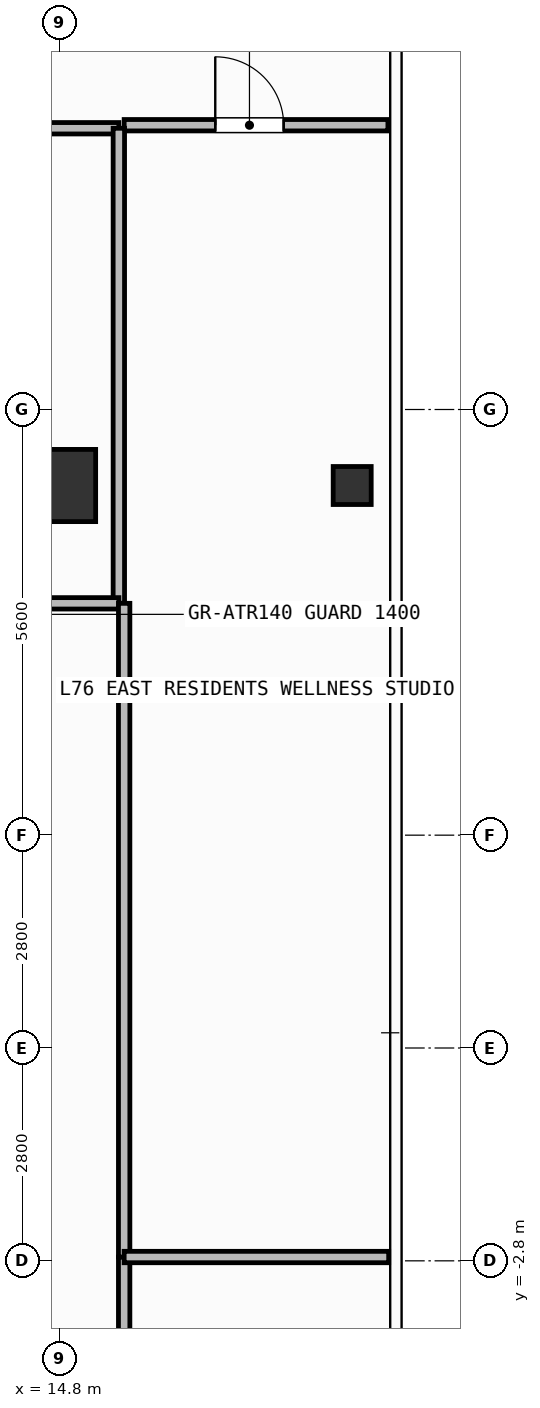
"""IFC4 building model, lengths in metres.
Left out: names, types, materials, properties, quantities, classifications, styles, units other than length and angle.
Written with IfcOpenShell. Run it as: python <this file> out.ifc"""

import sys

from ifc_helpers import new_model, si_unit, direction, frame, frame_2d, origin, origin_2d, place, context, subcontext, project, spatial, rectangle, hollow_rectangle, extrude, element, fill, save


model = new_model("IFC4")
c1 = context("Model", 3, precision=1e-05, world=origin(), true_north=direction((0.0, 1.0)))
c2 = subcontext(c1, "Body", "Model", "MODEL_VIEW")
j1 = project(units=[si_unit("LENGTHUNIT", "METRE"), si_unit("PLANEANGLEUNIT", "RADIAN")], contexts=[c1])
p1 = place(None, origin())
s1 = spatial("IfcSite", under=j1, at=p1, CompositionType="ELEMENT")
p2 = place(p1, origin())
s2 = spatial("IfcBuilding", under=s1, at=p2, CompositionType="ELEMENT")
p3 = place(p2, frame((0.0, 0.0, 309.3)))
s3 = spatial("IfcBuildingStorey", under=s2, at=p3, CompositionType="ELEMENT", Elevation=309.3)
p4 = place(p3, frame((14.8, 7.4, 0.0), z_axis=(0.0, 0.0, 1.0), x_axis=(1.0, 0.0, 0.0)))
e1 = element("IfcColumn", 1, at=p4, inside=s3, PredefinedType="COLUMN", context=c2, shape_type="SweptSolid", body=[
    extrude(rectangle(XDim=0.95, YDim=0.95, at=origin_2d()), origin(), (0.0, 0.0, 1.0), 3.9),
])
p5 = place(p3, frame((18.65, 7.4, 0.0), z_axis=(0.0, 0.0, 1.0), x_axis=(1.0, 0.0, 0.0)))
e2 = element("IfcColumn", 2, at=p5, inside=s3, PredefinedType="COLUMN", context=c2, shape_type="SweptSolid", body=[
    extrude(hollow_rectangle(XDim=0.5, YDim=0.5, WallThickness=0.025, at=origin_2d()), origin(), (0.0, 0.0, 1.0), 3.9),
])
p6 = place(p3, frame((8.36, 12.1, 0.0), z_axis=(0.0, 0.0, 1.0), x_axis=(1.0, 0.0, 0.0)))
e3 = element("IfcWall", 3, at=p6, inside=s3, PredefinedType="PARTITIONING", context=c2, shape_type="SweptSolid", body=[
    extrude(rectangle(XDim=7.22, YDim=0.15, at=frame_2d((3.61, 0.0))), origin(), (0.0, 0.0, 1.0), 3.64),
])
p7 = place(p6, frame((3.513, 0.0, 0.0)))
e4 = element("IfcOpeningElement", 4, at=p7, cuts=e3, PredefinedType="OPENING", context=c2, shape_type="SweptSolid", body=[
    extrude(rectangle(XDim=0.9, YDim=2.1, at=frame_2d((0.45, 1.05))), frame((0.0, 0.085, 0.0), z_axis=(0.0, -1.0, 0.0), x_axis=(1.0, 0.0, 0.0)), (0.0, 0.0, 1.0), 0.17),
])
p8 = place(p3, frame((15.65, 12.14, 0.0), z_axis=(0.0, 0.0, 1.0), x_axis=(1.0, 0.0, 0.0)))
e5 = element("IfcWall", 5, at=p8, inside=s3, PredefinedType="PARTITIONING", context=c2, shape_type="SweptSolid", body=[
    extrude(rectangle(XDim=3.47, YDim=0.15, at=frame_2d((1.735, 0.0))), origin(), (0.0, 0.0, 1.0), 3.64),
])
p9 = place(p8, frame((1.198, 0.0, 0.0)))
e6 = element("IfcOpeningElement", 6, at=p9, cuts=e5, PredefinedType="OPENING", context=c2, shape_type="SweptSolid", body=[
    extrude(rectangle(XDim=0.9, YDim=2.1, at=frame_2d((0.45, 1.05))), frame((0.0, 0.085, 0.0), z_axis=(0.0, -1.0, 0.0), x_axis=(1.0, 0.0, 0.0)), (0.0, 0.0, 1.0), 0.17),
])
p10 = place(p3, frame((15.58, 5.85, 0.0), z_axis=(0.0, 0.0, 1.0), x_axis=(0.0, 1.0, 0.0)))
e7 = element("IfcWall", 7, at=p10, inside=s3, PredefinedType="PARTITIONING", context=c2, shape_type="SweptSolid", body=[
    extrude(rectangle(XDim=6.25, YDim=0.15, at=frame_2d((3.125, 0.0))), origin(), (0.0, 0.0, 1.0), 3.33),
])
p11 = place(p3, frame((8.96, 5.85, 0.0), z_axis=(0.0, 0.0, 1.0), x_axis=(1.0, 0.0, 0.0)))
e8 = element("IfcWall", 8, at=p11, inside=s3, PredefinedType="PARTITIONING", context=c2, shape_type="SweptSolid", body=[
    extrude(rectangle(XDim=6.62, YDim=0.15, at=frame_2d((3.31, 0.0))), origin(), (0.0, 0.0, 1.0), 3.64),
])
p12 = place(p3, frame((15.65, -5.85, 0.0), z_axis=(0.0, 0.0, 1.0), x_axis=(0.0, 1.0, 0.0)))
e9 = element("IfcWall", 9, at=p12, inside=s3, PredefinedType="PARTITIONING", context=c2, shape_type="SweptSolid", body=[
    extrude(rectangle(XDim=3.1, YDim=0.15, at=frame_2d((1.55, 0.0))), origin(), (0.0, 0.0, 1.0), 3.33),
])
p13 = place(p3, frame((15.65, -2.75, 0.0), z_axis=(0.0, 0.0, 1.0), x_axis=(0.0, 1.0, 0.0)))
e10 = element("IfcWall", 10, at=p13, inside=s3, PredefinedType="PARTITIONING", context=c2, shape_type="SweptSolid", body=[
    extrude(rectangle(XDim=8.6, YDim=0.15, at=frame_2d((4.3, 0.0))), origin(), (0.0, 0.0, 1.0), 3.33),
])
p14 = place(p3, frame((15.65, -2.75, 0.0), z_axis=(0.0, 0.0, 1.0), x_axis=(1.0, 0.0, 0.0)))
e11 = element("IfcWall", 11, at=p14, inside=s3, PredefinedType="PARTITIONING", context=c2, shape_type="SweptSolid", body=[
    extrude(rectangle(XDim=3.48, YDim=0.15, at=frame_2d((1.74, 0.0))), origin(), (0.0, 0.0, 1.0), 3.64),
])
p15 = place(p9, origin())
e12 = element("IfcDoor", 12, at=p15, inside=s3, OperationType="SINGLE_SWING_LEFT", PredefinedType="DOOR", context=c2, shape_type="SweptSolid", body=[
    extrude(rectangle(XDim=0.9, YDim=2.1, at=frame_2d((0.45, 1.05))), frame((0.0, 0.025, 0.0), z_axis=(0.0, -1.0, 0.0), x_axis=(1.0, 0.0, 0.0)), (0.0, 0.0, 1.0), 0.05),
])
fill(e6, e12)
save(model, sys.argv[1])
